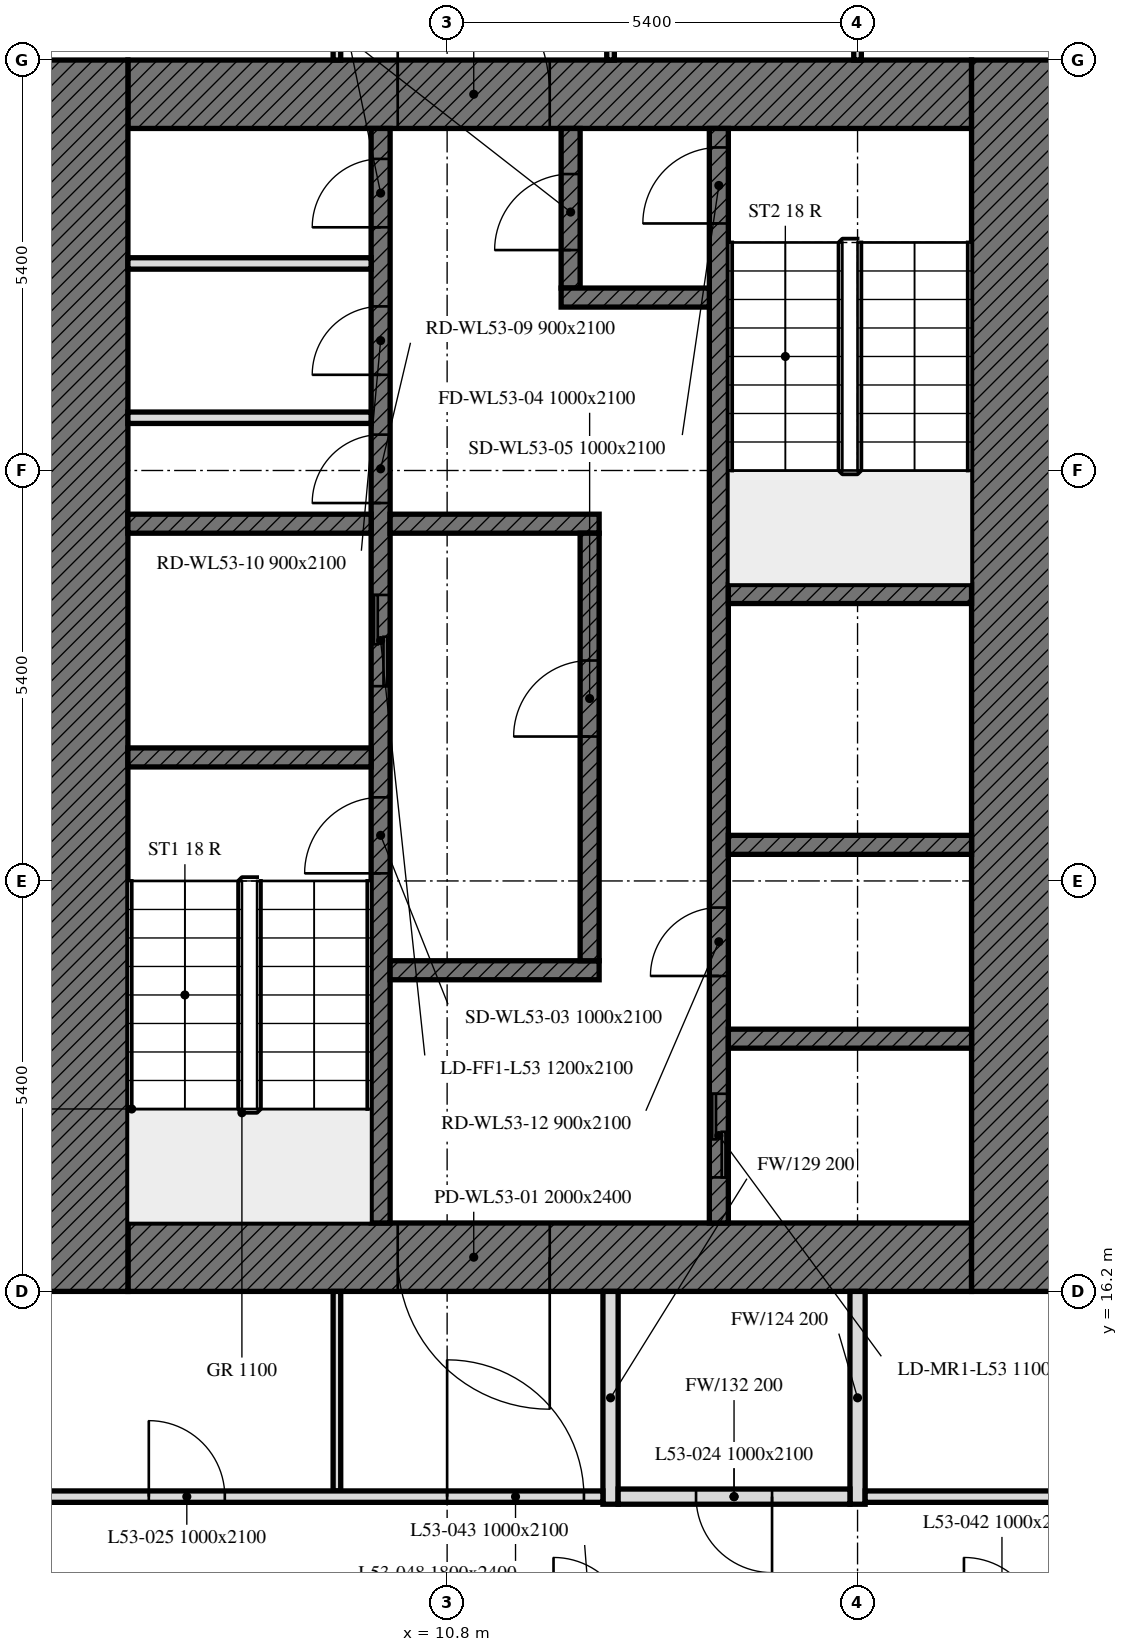
"""IFC4 building model, lengths in metres.
Left out: names, types, materials, properties, quantities, classifications, styles, units other than length and angle.
Written with IfcOpenShell. Run it as: python <this file> out.ifc"""

import sys

from ifc_helpers import new_model, si_unit, direction, frame, frame_2d, origin, place, context, subcontext, project, spatial, rectangle, extrude, element, fill, save


model = new_model("IFC4")
c1 = context("Model", 3, precision=1e-05, world=origin(), true_north=direction((0.0, 1.0)))
c2 = subcontext(c1, "Body", "Model", "MODEL_VIEW")
j1 = project(units=[si_unit("LENGTHUNIT", "METRE"), si_unit("PLANEANGLEUNIT", "RADIAN")], contexts=[c1])
p1 = place(None, origin())
s1 = spatial("IfcSite", under=j1, at=p1, CompositionType="ELEMENT")
p2 = place(p1, origin())
s2 = spatial("IfcBuilding", under=s1, at=p2, CompositionType="ELEMENT")
p3 = place(p2, frame((0.0, 0.0, 213.7)))
s3 = spatial("IfcBuildingStorey", under=s2, at=p3, CompositionType="ELEMENT", Elevation=213.7)
p4 = place(p3, frame((17.7, 16.65, 0.0), z_axis=(0.0, 0.0, 1.0), x_axis=(-1.0, 0.0, 0.0)))
e1 = element("IfcWall", 1, at=p4, inside=s3, PredefinedType="SOLIDWALL", context=c2, shape_type="SweptSolid", body=[
    extrude(rectangle(XDim=11.1, YDim=0.9, at=frame_2d((5.55, 0.0))), origin(), (0.0, 0.0, 1.0), 3.0),
])
p5 = place(p4, frame((5.55, 0.0, 0.0)))
e2 = element("IfcOpeningElement", 2, at=p5, cuts=e1, PredefinedType="OPENING", context=c2, shape_type="SweptSolid", body=[
    extrude(rectangle(XDim=2.0, YDim=2.4, at=frame_2d((1.0, 1.2))), frame((0.0, 0.45, 0.0), z_axis=(0.0, -1.0, 0.0), x_axis=(1.0, 0.0, 0.0)), (0.0, 0.0, 1.0), 0.9),
])
p6 = place(p3, frame((6.6, 31.95, 0.0), z_axis=(0.0, 0.0, 1.0), x_axis=(1.0, 0.0, 0.0)))
e3 = element("IfcWall", 3, at=p6, inside=s3, PredefinedType="SOLIDWALL", context=c2, shape_type="SweptSolid", body=[
    extrude(rectangle(XDim=11.1, YDim=0.9, at=frame_2d((5.55, 0.0))), origin(), (0.0, 0.0, 1.0), 3.0),
])
p7 = place(p6, frame((3.55, 0.0, 0.0)))
e4 = element("IfcOpeningElement", 4, at=p7, cuts=e3, PredefinedType="OPENING", context=c2, shape_type="SweptSolid", body=[
    extrude(rectangle(XDim=2.0, YDim=2.4, at=frame_2d((1.0, 1.2))), frame((0.0, 0.45, 0.0), z_axis=(0.0, -1.0, 0.0), x_axis=(1.0, 0.0, 0.0)), (0.0, 0.0, 1.0), 0.9),
])
for number, where, z_axis, x_axis in (
    (5, (6.0, 16.2, 0.0), (0.0, 0.0, 1.0), (0.0, 1.0, 0.0)),
    (6, (18.3, 32.4, 0.0), (0.0, 0.0, 1.0), (0.0, -1.0, 0.0)),
):
    element("IfcWall", number, at=place(p3, frame(where, z_axis=z_axis, x_axis=x_axis)), inside=s3, PredefinedType="SOLIDWALL", context=c2, shape_type="SweptSolid", body=[
        extrude(rectangle(XDim=16.2, YDim=1.2, at=frame_2d((8.1, 0.0))), origin(), (0.0, 0.0, 1.0), 3.0),
    ])
p8 = place(p3, frame((9.925, 17.1, 0.0), z_axis=(0.0, 0.0, 1.0), x_axis=(0.0, 1.0, 0.0)))
e7 = element("IfcWall", 7, at=p8, inside=s3, PredefinedType="SOLIDWALL", context=c2, shape_type="SweptSolid", body=[
    extrude(rectangle(XDim=14.4, YDim=0.25, at=frame_2d((7.2, 0.0))), origin(), (0.0, 0.0, 1.0), 3.0),
])
p9 = place(p8, frame((4.6, 0.0, 0.0)))
e8 = element("IfcOpeningElement", 8, at=p9, cuts=e7, PredefinedType="OPENING", context=c2, shape_type="SweptSolid", body=[
    extrude(rectangle(XDim=1.0, YDim=2.1, at=frame_2d((0.5, 1.05))), frame((0.0, 0.125, 0.0), z_axis=(0.0, -1.0, 0.0), x_axis=(1.0, 0.0, 0.0)), (0.0, 0.0, 1.0), 0.25),
])
p10 = place(p8, frame((7.062, 0.0, 0.0)))
e9 = element("IfcOpeningElement", 9, at=p10, cuts=e7, PredefinedType="OPENING", context=c2, shape_type="SweptSolid", body=[
    extrude(rectangle(XDim=1.2, YDim=2.1, at=frame_2d((0.6, 1.05))), frame((0.0, 0.125, 0.0), z_axis=(0.0, -1.0, 0.0), x_axis=(1.0, 0.0, 0.0)), (0.0, 0.0, 1.0), 0.25),
])
p11 = place(p8, frame((9.472, 0.0, 0.0)))
e10 = element("IfcOpeningElement", 10, at=p11, cuts=e7, PredefinedType="OPENING", context=c2, shape_type="SweptSolid", body=[
    extrude(rectangle(XDim=0.9, YDim=2.1, at=frame_2d((0.45, 1.05))), frame((0.0, 0.125, 0.0), z_axis=(0.0, -1.0, 0.0), x_axis=(1.0, 0.0, 0.0)), (0.0, 0.0, 1.0), 0.25),
])
p12 = place(p8, frame((11.159, 0.0, 0.0)))
e11 = element("IfcOpeningElement", 11, at=p12, cuts=e7, PredefinedType="OPENING", context=c2, shape_type="SweptSolid", body=[
    extrude(rectangle(XDim=0.9, YDim=2.1, at=frame_2d((0.45, 1.05))), frame((0.0, 0.125, 0.0), z_axis=(0.0, -1.0, 0.0), x_axis=(1.0, 0.0, 0.0)), (0.0, 0.0, 1.0), 0.25),
])
p13 = place(p8, frame((13.1, 0.0, 0.0)))
e12 = element("IfcOpeningElement", 12, at=p13, cuts=e7, PredefinedType="OPENING", context=c2, shape_type="SweptSolid", body=[
    extrude(rectangle(XDim=0.9, YDim=2.1, at=frame_2d((0.45, 1.05))), frame((0.0, 0.125, 0.0), z_axis=(0.0, -1.0, 0.0), x_axis=(1.0, 0.0, 0.0)), (0.0, 0.0, 1.0), 0.25),
])
p14 = place(p3, frame((14.375, 17.1, 0.0), z_axis=(0.0, 0.0, 1.0), x_axis=(0.0, 1.0, 0.0)))
e13 = element("IfcWall", 13, at=p14, inside=s3, PredefinedType="SOLIDWALL", context=c2, shape_type="SweptSolid", body=[
    extrude(rectangle(XDim=14.4, YDim=0.25, at=frame_2d((7.2, 0.0))), origin(), (0.0, 0.0, 1.0), 3.0),
])
p15 = place(p14, frame((13.15, 0.0, 0.0)))
e14 = element("IfcOpeningElement", 14, at=p15, cuts=e13, PredefinedType="OPENING", context=c2, shape_type="SweptSolid", body=[
    extrude(rectangle(XDim=1.0, YDim=2.1, at=frame_2d((0.5, 1.05))), frame((0.0, 0.125, 0.0), z_axis=(0.0, -1.0, 0.0), x_axis=(1.0, 0.0, 0.0)), (0.0, 0.0, 1.0), 0.25),
])
p16 = place(p14, frame((0.6, 0.0, 0.0)))
e15 = element("IfcOpeningElement", 15, at=p16, cuts=e13, PredefinedType="OPENING", context=c2, shape_type="SweptSolid", body=[
    extrude(rectangle(XDim=1.1, YDim=2.1, at=frame_2d((0.55, 1.05))), frame((0.0, 0.125, 0.0), z_axis=(0.0, -1.0, 0.0), x_axis=(1.0, 0.0, 0.0)), (0.0, 0.0, 1.0), 0.25),
])
p17 = place(p14, frame((3.25, 0.0, 0.0)))
e16 = element("IfcOpeningElement", 16, at=p17, cuts=e13, PredefinedType="OPENING", context=c2, shape_type="SweptSolid", body=[
    extrude(rectangle(XDim=0.9, YDim=2.1, at=frame_2d((0.45, 1.05))), frame((0.0, 0.125, 0.0), z_axis=(0.0, -1.0, 0.0), x_axis=(1.0, 0.0, 0.0)), (0.0, 0.0, 1.0), 0.25),
])
for number, where, z_axis, x_axis in (
    (17, (6.6, 23.225, 0.0), (0.0, 0.0, 1.0), (1.0, 0.0, 0.0)),
    (18, (14.5, 25.375, 0.0), (0.0, 0.0, 1.0), (1.0, 0.0, 0.0)),
    (19, (14.5, 22.075, 0.0), (0.0, 0.0, 1.0), (1.0, 0.0, 0.0)),
    (20, (6.6, 26.3, 0.0), (0.0, 0.0, 1.0), (1.0, 0.0, 0.0)),
):
    element("IfcWall", number, at=place(p3, frame(where, z_axis=z_axis, x_axis=x_axis)), inside=s3, PredefinedType="SOLIDWALL", context=c2, shape_type="SweptSolid", body=[
        extrude(rectangle(XDim=3.2, YDim=0.25, at=frame_2d((1.6, 0.0))), origin(), (0.0, 0.0, 1.0), 3.0),
    ])
for number, where, z_axis, x_axis in (
    (21, (10.05, 26.3, 0.0), (0.0, 0.0, 1.0), (1.0, 0.0, 0.0)),
    (22, (10.05, 20.425, 0.0), (0.0, 0.0, 1.0), (1.0, 0.0, 0.0)),
):
    element("IfcWall", number, at=place(p3, frame(where, z_axis=z_axis, x_axis=x_axis)), inside=s3, PredefinedType="SOLIDWALL", context=c2, shape_type="SweptSolid", body=[
        extrude(rectangle(XDim=2.75, YDim=0.25, at=frame_2d((1.375, 0.0))), origin(), (0.0, 0.0, 1.0), 3.0),
    ])
p18 = place(p3, frame((12.425, 29.4, 0.0), z_axis=(0.0, 0.0, 1.0), x_axis=(0.0, 1.0, 0.0)))
e23 = element("IfcWall", 23, at=p18, inside=s3, PredefinedType="SOLIDWALL", context=c2, shape_type="SweptSolid", body=[
    extrude(rectangle(XDim=2.1, YDim=0.25, at=frame_2d((1.05, 0.0))), origin(), (0.0, 0.0, 1.0), 3.0),
])
p19 = place(p18, frame((0.5, 0.0, 0.0)))
e24 = element("IfcOpeningElement", 24, at=p19, cuts=e23, PredefinedType="OPENING", context=c2, shape_type="SweptSolid", body=[
    extrude(rectangle(XDim=1.0, YDim=2.1, at=frame_2d((0.5, 1.05))), frame((0.0, 0.125, 0.0), z_axis=(0.0, -1.0, 0.0), x_axis=(1.0, 0.0, 0.0)), (0.0, 0.0, 1.0), 0.25),
])
p20 = place(p3, frame((12.3, 29.275, 0.0), z_axis=(0.0, 0.0, 1.0), x_axis=(1.0, 0.0, 0.0)))
e25 = element("IfcWall", 25, at=p20, inside=s3, PredefinedType="SOLIDWALL", context=c2, shape_type="SweptSolid", body=[
    extrude(rectangle(XDim=1.95, YDim=0.25, at=frame_2d((0.975, 0.0))), origin(), (0.0, 0.0, 1.0), 3.0),
])
p21 = place(p3, frame((12.675, 20.55, 0.0), z_axis=(0.0, 0.0, 1.0), x_axis=(0.0, 1.0, 0.0)))
e26 = element("IfcWall", 26, at=p21, inside=s3, PredefinedType="SOLIDWALL", context=c2, shape_type="SweptSolid", body=[
    extrude(rectangle(XDim=5.625, YDim=0.25, at=frame_2d((2.812, 0.0))), origin(), (0.0, 0.0, 1.0), 3.0),
])
p22 = place(p21, frame((2.95, 0.0, 0.0)))
e27 = element("IfcOpeningElement", 27, at=p22, cuts=e26, PredefinedType="OPENING", context=c2, shape_type="SweptSolid", body=[
    extrude(rectangle(XDim=1.0, YDim=2.1, at=frame_2d((0.5, 1.05))), frame((0.0, 0.125, 0.0), z_axis=(0.0, -1.0, 0.0), x_axis=(1.0, 0.0, 0.0)), (0.0, 0.0, 1.0), 0.25),
])
p23 = place(p3, frame((14.5, 19.525, 0.0), z_axis=(0.0, 0.0, 1.0), x_axis=(1.0, 0.0, 0.0)))
e28 = element("IfcWall", 28, at=p23, inside=s3, PredefinedType="SOLIDWALL", context=c2, shape_type="SweptSolid", body=[
    extrude(rectangle(XDim=3.2, YDim=0.25, at=frame_2d((1.6, 0.0))), origin(), (0.0, 0.0, 1.0), 3.0),
])
for number, where, z_axis, x_axis in (
    (29, (6.6, 27.694, 0.0), (0.0, 0.0, 1.0), (1.0, 0.0, 0.0)),
    (30, (6.6, 29.724, 0.0), (0.0, 0.0, 1.0), (1.0, 0.0, 0.0)),
):
    element("IfcWall", number, at=place(p3, frame(where, z_axis=z_axis, x_axis=x_axis)), inside=s3, PredefinedType="PARTITIONING", context=c2, shape_type="SweptSolid", body=[
        extrude(rectangle(XDim=3.2, YDim=0.15, at=frame_2d((1.6, 0.0))), origin(), (0.0, 0.0, 1.0), 3.0),
    ])
p24 = place(p3, frame((16.2, 37.405, 0.0), z_axis=(0.0, 0.0, 1.0), x_axis=(0.0, -1.0, 0.0)))
e31 = element("IfcWall", 31, at=p24, inside=s3, PredefinedType="PARTITIONING", context=c2, shape_type="SweptSolid", body=[
    extrude(rectangle(XDim=5.005, YDim=0.1, at=frame_2d((2.502, 0.0))), origin(), (0.0, 0.0, 1.0), 2.4),
])
for number, where, z_axis, x_axis in (
    (32, (12.95, 32.4, 0.0), (0.0, 0.0, 1.0), (0.0, 1.0, 0.0)),
    (33, (9.35, 38.175, 0.0), (0.0, 0.0, 1.0), (0.0, -1.0, 0.0)),
):
    element("IfcWall", number, at=place(p3, frame(where, z_axis=z_axis, x_axis=x_axis)), inside=s3, PredefinedType="PARTITIONING", context=c2, shape_type="SweptSolid", body=[
        extrude(rectangle(XDim=5.775, YDim=0.1, at=frame_2d((2.888, 0.0))), origin(), (0.0, 0.0, 1.0), 2.4),
    ])
for number, where, z_axis, x_axis in (
    (34, (16.2, 16.2, 0.0), (0.0, 0.0, 1.0), (0.0, -1.0, 0.0)),
    (35, (12.95, 13.4, 0.0), (0.0, 0.0, 1.0), (0.0, 1.0, 0.0)),
):
    element("IfcWall", number, at=place(p3, frame(where, z_axis=z_axis, x_axis=x_axis)), inside=s3, PredefinedType="PARTITIONING", context=c2, shape_type="SweptSolid", body=[
        extrude(rectangle(XDim=2.8, YDim=0.2, at=frame_2d((1.4, 0.0))), origin(), (0.0, 0.0, 1.0), 3.0),
    ])
p25 = place(p3, frame((9.35, 16.2, 0.0), z_axis=(0.0, 0.0, 1.0), x_axis=(0.0, -1.0, 0.0)))
e36 = element("IfcWall", 36, at=p25, inside=s3, PredefinedType="PARTITIONING", context=c2, shape_type="SweptSolid", body=[
    extrude(rectangle(XDim=2.625, YDim=0.1, at=frame_2d((1.312, 0.0))), origin(), (0.0, 0.0, 1.0), 3.0),
])
p26 = place(p3, frame((16.3, 13.5, 0.0), z_axis=(0.0, 0.0, 1.0), x_axis=(1.0, 0.0, 0.0)))
e37 = element("IfcWall", 37, at=p26, inside=s3, PredefinedType="PARTITIONING", context=c2, shape_type="SweptSolid", body=[
    extrude(rectangle(XDim=26.149, YDim=0.15, at=frame_2d((13.074, 0.0))), origin(), (0.0, 0.0, 1.0), 3.0),
])
p27 = place(p26, frame((7.5, 0.0, 0.0)))
e38 = element("IfcOpeningElement", 38, at=p27, cuts=e37, PredefinedType="OPENING", context=c2, shape_type="SweptSolid", body=[
    extrude(rectangle(XDim=1.0, YDim=2.1, at=frame_2d((0.5, 1.05))), frame((0.0, 0.075, 0.0), z_axis=(0.0, -1.0, 0.0), x_axis=(1.0, 0.0, 0.0)), (0.0, 0.0, 1.0), 0.15),
])
p28 = place(p26, frame((23.12, 0.0, 0.0)))
e39 = element("IfcOpeningElement", 39, at=p28, cuts=e37, PredefinedType="OPENING", context=c2, shape_type="SweptSolid", body=[
    extrude(rectangle(XDim=1.0, YDim=2.1, at=frame_2d((0.5, 1.05))), frame((0.0, 0.075, 0.0), z_axis=(0.0, -1.0, 0.0), x_axis=(1.0, 0.0, 0.0)), (0.0, 0.0, 1.0), 0.15),
])
p29 = place(p26, frame((17.225, 0.0, 0.0)))
e40 = element("IfcOpeningElement", 40, at=p29, cuts=e37, PredefinedType="OPENING", context=c2, shape_type="SweptSolid", body=[
    extrude(rectangle(XDim=1.0, YDim=2.1, at=frame_2d((0.5, 1.05))), frame((0.0, 0.075, 0.0), z_axis=(0.0, -1.0, 0.0), x_axis=(1.0, 0.0, 0.0)), (0.0, 0.0, 1.0), 0.15),
])
p30 = place(p26, frame((19.65, 0.0, 0.0)))
e41 = element("IfcOpeningElement", 41, at=p30, cuts=e37, PredefinedType="OPENING", context=c2, shape_type="SweptSolid", body=[
    extrude(rectangle(XDim=1.8, YDim=2.4, at=frame_2d((0.9, 1.2))), frame((0.0, 0.075, 0.0), z_axis=(0.0, -1.0, 0.0), x_axis=(1.0, 0.0, 0.0)), (0.0, 0.0, 1.0), 0.15),
])
p31 = place(p3, frame((16.1, 13.5, 0.0), z_axis=(0.0, 0.0, 1.0), x_axis=(-1.0, 0.0, 0.0)))
e42 = element("IfcWall", 42, at=p31, inside=s3, PredefinedType="PARTITIONING", context=c2, shape_type="SweptSolid", body=[
    extrude(rectangle(XDim=3.05, YDim=0.2, at=frame_2d((1.525, 0.0))), origin(), (0.0, 0.0, 1.0), 3.0),
])
p32 = place(p31, frame((1.025, 0.0, 0.0)))
e43 = element("IfcOpeningElement", 43, at=p32, cuts=e42, PredefinedType="OPENING", context=c2, shape_type="SweptSolid", body=[
    extrude(rectangle(XDim=1.0, YDim=2.1, at=frame_2d((0.5, 1.05))), frame((0.0, 0.1, 0.0), z_axis=(0.0, -1.0, 0.0), x_axis=(1.0, 0.0, 0.0)), (0.0, 0.0, 1.0), 0.2),
])
p33 = place(p3, frame((5.325, 13.5, 0.0), z_axis=(0.0, 0.0, 1.0), x_axis=(1.0, 0.0, 0.0)))
e44 = element("IfcWall", 44, at=p33, inside=s3, PredefinedType="PARTITIONING", context=c2, shape_type="SweptSolid", body=[
    extrude(rectangle(XDim=7.525, YDim=0.15, at=frame_2d((3.763, 0.0))), origin(), (0.0, 0.0, 1.0), 3.0),
])
p34 = place(p33, frame((1.55, 0.0, 0.0)))
e45 = element("IfcOpeningElement", 45, at=p34, cuts=e44, PredefinedType="OPENING", context=c2, shape_type="SweptSolid", body=[
    extrude(rectangle(XDim=1.0, YDim=2.1, at=frame_2d((0.5, 1.05))), frame((0.0, 0.075, 0.0), z_axis=(0.0, -1.0, 0.0), x_axis=(1.0, 0.0, 0.0)), (0.0, 0.0, 1.0), 0.15),
])
p35 = place(p33, frame((5.475, 0.0, 0.0)))
e46 = element("IfcOpeningElement", 46, at=p35, cuts=e44, PredefinedType="OPENING", context=c2, shape_type="SweptSolid", body=[
    extrude(rectangle(XDim=1.8, YDim=2.4, at=frame_2d((0.9, 1.2))), frame((0.0, 0.075, 0.0), z_axis=(0.0, -1.0, 0.0), x_axis=(1.0, 0.0, 0.0)), (0.0, 0.0, 1.0), 0.15),
])
p36 = place(p5, origin())
e47 = element("IfcDoor", 47, at=p36, inside=s3, OperationType="DOUBLE_DOOR_SINGLE_SWING", PredefinedType="DOOR", context=c2, shape_type="SweptSolid", body=[
    extrude(rectangle(XDim=2.0, YDim=2.4, at=frame_2d((1.0, 1.2))), frame((0.0, 0.025, 0.0), z_axis=(0.0, -1.0, 0.0), x_axis=(1.0, 0.0, 0.0)), (0.0, 0.0, 1.0), 0.05),
])
fill(e2, e47)
p37 = place(p7, origin())
e48 = element("IfcDoor", 48, at=p37, inside=s3, OperationType="DOUBLE_DOOR_SINGLE_SWING", PredefinedType="DOOR", context=c2, shape_type="SweptSolid", body=[
    extrude(rectangle(XDim=2.0, YDim=2.4, at=frame_2d((1.0, 1.2))), frame((0.0, 0.025, 0.0), z_axis=(0.0, -1.0, 0.0), x_axis=(1.0, 0.0, 0.0)), (0.0, 0.0, 1.0), 0.05),
])
fill(e4, e48)
p38 = place(p9, origin())
e49 = element("IfcDoor", 49, at=p38, inside=s3, OperationType="SINGLE_SWING_LEFT", PredefinedType="DOOR", context=c2, shape_type="SweptSolid", body=[
    extrude(rectangle(XDim=1.0, YDim=2.1, at=frame_2d((0.5, 1.05))), frame((0.0, 0.025, 0.0), z_axis=(0.0, -1.0, 0.0), x_axis=(1.0, 0.0, 0.0)), (0.0, 0.0, 1.0), 0.05),
])
fill(e8, e49)
p39 = place(p22, origin())
e50 = element("IfcDoor", 50, at=p39, inside=s3, OperationType="SINGLE_SWING_LEFT", PredefinedType="DOOR", context=c2, shape_type="SweptSolid", body=[
    extrude(rectangle(XDim=1.0, YDim=2.1, at=frame_2d((0.5, 1.05))), frame((0.0, 0.025, 0.0), z_axis=(0.0, -1.0, 0.0), x_axis=(1.0, 0.0, 0.0)), (0.0, 0.0, 1.0), 0.05),
])
fill(e27, e50)
p40 = place(p15, origin())
e51 = element("IfcDoor", 51, at=p40, inside=s3, OperationType="SINGLE_SWING_LEFT", PredefinedType="DOOR", context=c2, shape_type="SweptSolid", body=[
    extrude(rectangle(XDim=1.0, YDim=2.1, at=frame_2d((0.5, 1.05))), frame((0.0, 0.025, 0.0), z_axis=(0.0, -1.0, 0.0), x_axis=(1.0, 0.0, 0.0)), (0.0, 0.0, 1.0), 0.05),
])
fill(e14, e51)
p41 = place(p19, origin())
e52 = element("IfcDoor", 52, at=p41, inside=s3, OperationType="SINGLE_SWING_LEFT", PredefinedType="DOOR", context=c2, shape_type="SweptSolid", body=[
    extrude(rectangle(XDim=1.0, YDim=2.1, at=frame_2d((0.5, 1.05))), frame((0.0, 0.025, 0.0), z_axis=(0.0, -1.0, 0.0), x_axis=(1.0, 0.0, 0.0)), (0.0, 0.0, 1.0), 0.05),
])
fill(e24, e52)
p42 = place(p10, origin())
e53 = element("IfcDoor", 53, at=p42, inside=s3, OperationType="DOUBLE_DOOR_SLIDING", PredefinedType="DOOR", context=c2, shape_type="SweptSolid", body=[
    extrude(rectangle(XDim=1.2, YDim=2.1, at=frame_2d((0.6, 1.05))), frame((0.0, 0.025, 0.0), z_axis=(0.0, -1.0, 0.0), x_axis=(1.0, 0.0, 0.0)), (0.0, 0.0, 1.0), 0.05),
])
fill(e9, e53)
p43 = place(p16, origin())
e54 = element("IfcDoor", 54, at=p43, inside=s3, OperationType="DOUBLE_DOOR_SLIDING", PredefinedType="DOOR", context=c2, shape_type="SweptSolid", body=[
    extrude(rectangle(XDim=1.1, YDim=2.1, at=frame_2d((0.55, 1.05))), frame((0.0, 0.025, 0.0), z_axis=(0.0, -1.0, 0.0), x_axis=(1.0, 0.0, 0.0)), (0.0, 0.0, 1.0), 0.05),
])
fill(e15, e54)
p44 = place(p11, origin())
e55 = element("IfcDoor", 55, at=p44, inside=s3, OperationType="SINGLE_SWING_LEFT", PredefinedType="DOOR", context=c2, shape_type="SweptSolid", body=[
    extrude(rectangle(XDim=0.9, YDim=2.1, at=frame_2d((0.45, 1.05))), frame((0.0, 0.025, 0.0), z_axis=(0.0, -1.0, 0.0), x_axis=(1.0, 0.0, 0.0)), (0.0, 0.0, 1.0), 0.05),
])
fill(e10, e55)
p45 = place(p12, origin())
e56 = element("IfcDoor", 56, at=p45, inside=s3, OperationType="SINGLE_SWING_LEFT", PredefinedType="DOOR", context=c2, shape_type="SweptSolid", body=[
    extrude(rectangle(XDim=0.9, YDim=2.1, at=frame_2d((0.45, 1.05))), frame((0.0, 0.025, 0.0), z_axis=(0.0, -1.0, 0.0), x_axis=(1.0, 0.0, 0.0)), (0.0, 0.0, 1.0), 0.05),
])
fill(e11, e56)
p46 = place(p13, origin())
e57 = element("IfcDoor", 57, at=p46, inside=s3, OperationType="SINGLE_SWING_LEFT", PredefinedType="DOOR", context=c2, shape_type="SweptSolid", body=[
    extrude(rectangle(XDim=0.9, YDim=2.1, at=frame_2d((0.45, 1.05))), frame((0.0, 0.025, 0.0), z_axis=(0.0, -1.0, 0.0), x_axis=(1.0, 0.0, 0.0)), (0.0, 0.0, 1.0), 0.05),
])
fill(e12, e57)
p47 = place(p17, origin())
e58 = element("IfcDoor", 58, at=p47, inside=s3, OperationType="SINGLE_SWING_LEFT", PredefinedType="DOOR", context=c2, shape_type="SweptSolid", body=[
    extrude(rectangle(XDim=0.9, YDim=2.1, at=frame_2d((0.45, 1.05))), frame((0.0, 0.025, 0.0), z_axis=(0.0, -1.0, 0.0), x_axis=(1.0, 0.0, 0.0)), (0.0, 0.0, 1.0), 0.05),
])
fill(e16, e58)
p48 = place(p32, origin())
e59 = element("IfcDoor", 59, at=p48, inside=s3, OperationType="SINGLE_SWING_RIGHT", PredefinedType="DOOR", context=c2, shape_type="SweptSolid", body=[
    extrude(rectangle(XDim=1.0, YDim=2.1, at=frame_2d((0.5, 1.05))), frame((0.0, 0.025, 0.0), z_axis=(0.0, -1.0, 0.0), x_axis=(1.0, 0.0, 0.0)), (0.0, 0.0, 1.0), 0.05),
])
fill(e43, e59)
p49 = place(p34, origin())
e60 = element("IfcDoor", 60, at=p49, inside=s3, OperationType="SINGLE_SWING_LEFT", PredefinedType="DOOR", context=c2, shape_type="SweptSolid", body=[
    extrude(rectangle(XDim=1.0, YDim=2.1, at=frame_2d((0.5, 1.05))), frame((0.0, 0.025, 0.0), z_axis=(0.0, -1.0, 0.0), x_axis=(1.0, 0.0, 0.0)), (0.0, 0.0, 1.0), 0.05),
])
fill(e45, e60)
p50 = place(p35, origin())
e61 = element("IfcDoor", 61, at=p50, inside=s3, OperationType="DOUBLE_DOOR_SINGLE_SWING", PredefinedType="DOOR", context=c2, shape_type="SweptSolid", body=[
    extrude(rectangle(XDim=1.8, YDim=2.4, at=frame_2d((0.9, 1.2))), frame((0.0, 0.025, 0.0), z_axis=(0.0, -1.0, 0.0), x_axis=(1.0, 0.0, 0.0)), (0.0, 0.0, 1.0), 0.05),
])
fill(e46, e61)
save(model, sys.argv[1])
